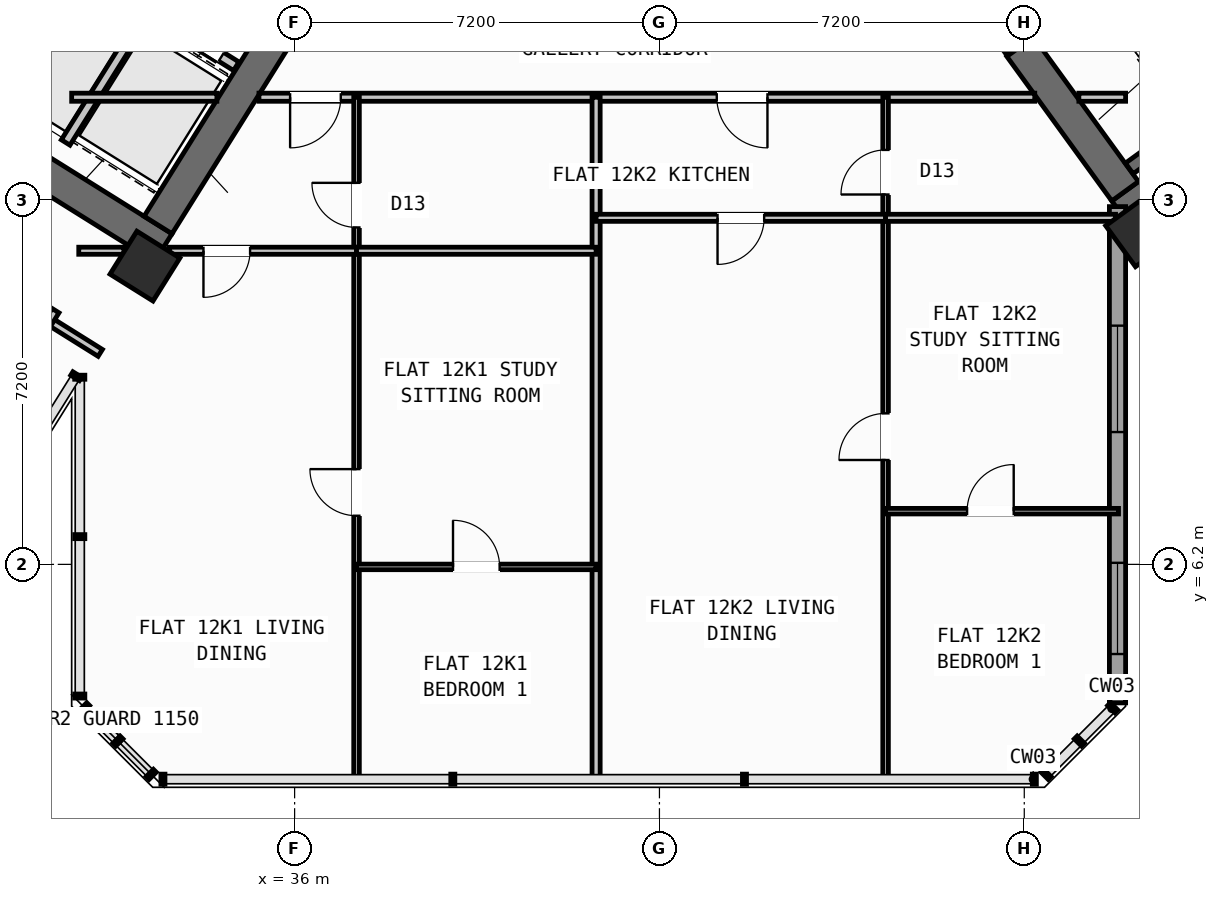
"""IFC4 building model, lengths in metres.
Left out: names, types, materials, properties, quantities, classifications, styles, units other than length and angle.
Written with IfcOpenShell. Run it as: python <this file> out.ifc"""

import sys

from ifc_helpers import new_model, si_unit, direction, frame, frame_2d, origin, origin_2d, place, context, subcontext, project, spatial, rectangle, hollow_rectangle, extrude, source, transform, mapped, element, fill, save


model = new_model("IFC4")
c1 = context("Model", 3, precision=1e-05, world=origin(), true_north=direction((0.0, 1.0)))
c2 = subcontext(c1, "Body", "Model", "MODEL_VIEW")
j1 = project(units=[si_unit("LENGTHUNIT", "METRE"), si_unit("PLANEANGLEUNIT", "RADIAN")], contexts=[c1])
p1 = place(None, origin())
s1 = spatial("IfcSite", under=j1, at=p1, CompositionType="ELEMENT")
p2 = place(p1, origin())
s2 = spatial("IfcBuilding", under=s1, at=p2, CompositionType="ELEMENT")
p3 = place(p2, frame((0.0, 0.0, 49.2)))
s3 = spatial("IfcBuildingStorey", under=s2, at=p3, CompositionType="ELEMENT", Elevation=49.2)
p4 = place(p3, frame((33.409, 12.45, 0.0), z_axis=(0.0, 0.0, 1.0), x_axis=(-0.848051132073, 0.529914405721, 0.0)))
e1 = element("IfcWall", 1, at=p4, inside=s3, PredefinedType="SHEAR", context=c2, shape_type="SweptSolid", body=[
    extrude(rectangle(XDim=13.24, YDim=0.65, at=frame_2d((6.62, 0.0))), origin(), (0.0, 0.0, 1.0), 3.35),
])
p5 = place(p3, frame((36.683, 18.304, 0.0), z_axis=(0.0, 0.0, 1.0), x_axis=(-0.529899109053, -0.848060690178, 0.0)))
e2 = element("IfcWall", 2, at=p5, inside=s3, PredefinedType="SHEAR", context=c2, shape_type="SweptSolid", body=[
    extrude(rectangle(XDim=6.375, YDim=0.65, at=frame_2d((3.188, 0.0))), origin(), (0.0, 0.0, 1.0), 3.35),
])
p6 = place(p3, frame((52.318, 13.11, 0.0), z_axis=(0.0, 0.0, 1.0), x_axis=(0.809019445368, 0.587781878776, 0.0)))
e3 = element("IfcWall", 3, at=p6, inside=s3, PredefinedType="SHEAR", context=c2, shape_type="SweptSolid", body=[
    extrude(rectangle(XDim=12.44, YDim=0.65, at=frame_2d((6.22, 0.0))), origin(), (0.0, 0.0, 1.0), 3.35),
])
p7 = place(p3, frame((52.39, 13.564, 0.0), z_axis=(0.0, 0.0, 1.0), x_axis=(-0.58779688989, 0.809008539037, 0.0)))
e4 = element("IfcWall", 4, at=p7, inside=s3, PredefinedType="SHEAR", context=c2, shape_type="SweptSolid", body=[
    extrude(rectangle(XDim=3.525, YDim=0.65, at=frame_2d((1.763, 0.0))), origin(), (0.0, 0.0, 1.0), 3.35),
])
m1 = source(origin(), c2, "Body", "SweptSolid", [
    extrude(hollow_rectangle(XDim=1.0, YDim=1.0, WallThickness=0.04, at=origin_2d()), origin(), (0.0, 0.0, 1.0), 3.6),
])
for number, where, z_axis, x_axis in (
    (5, (33.046, 12.087, 0.0), (0.0, 0.0, 1.0), (-0.848, 0.53, 0.0)),
    (6, (52.705, 12.773, 0.0), (0.0, 0.0, 1.0), (0.809, 0.588, 0.0)),
):
    element("IfcColumn", number, at=place(p3, frame(where, z_axis=z_axis, x_axis=x_axis)), inside=s3, PredefinedType="COLUMN", context=c2, shape_type="MappedRepresentation", body=[
        mapped(m1, transform((0.0, 0.0, 0.0), scale=1.0)),
    ])
p8 = place(p3, frame((56.581, 7.439, 0.0), z_axis=(0.0, 0.0, 1.0), x_axis=(-0.587785875463, 0.809016541614, 0.0)))
e7 = element("IfcWall", 7, at=p8, inside=s3, PredefinedType="STANDARD", context=c2, shape_type="SweptSolid", body=[
    extrude(rectangle(XDim=6.774, YDim=0.32, at=frame_2d((3.387, 0.0))), origin(), (0.0, 0.0, 1.0), 2.725),
])
p9 = place(p8, frame((1.556, 0.0, 0.8)))
e8 = element("IfcOpeningElement", 8, at=p9, cuts=e7, PredefinedType="OPENING", context=c2, shape_type="SweptSolid", body=[
    extrude(rectangle(XDim=2.1, YDim=1.55, at=frame_2d((1.05, 0.775))), frame((0.0, 0.17, 0.0), z_axis=(0.0, -1.0, 0.0), x_axis=(1.0, 0.0, 0.0)), (0.0, 0.0, 1.0), 0.34),
])
p10 = place(p3, frame((52.24, 13.261, 0.0), z_axis=(0.0, 0.0, 1.0), x_axis=(0.0, -1.0, 0.0)))
e9 = element("IfcWall", 9, at=p10, inside=s3, PredefinedType="STANDARD", context=c2, shape_type="SweptSolid", body=[
    extrude(rectangle(XDim=9.795, YDim=0.32, at=frame_2d((4.897, 0.0))), origin(), (0.0, 0.0, 1.0), 3.35),
])
p11 = place(p10, frame((2.349, 0.0, 0.8)))
e10 = element("IfcOpeningElement", 10, at=p11, cuts=e9, PredefinedType="OPENING", context=c2, shape_type="SweptSolid", body=[
    extrude(rectangle(XDim=2.1, YDim=1.55, at=frame_2d((1.05, 0.775))), frame((0.0, 0.17, 0.0), z_axis=(0.0, -1.0, 0.0), x_axis=(1.0, 0.0, 0.0)), (0.0, 0.0, 1.0), 0.34),
])
p12 = place(p10, frame((7.03, 0.0, 0.85)))
e11 = element("IfcOpeningElement", 11, at=p12, cuts=e9, PredefinedType="OPENING", context=c2, shape_type="SweptSolid", body=[
    extrude(rectangle(XDim=1.8, YDim=1.5, at=frame_2d((0.9, 0.75))), frame((0.0, 0.17, 0.0), z_axis=(0.0, -1.0, 0.0), x_axis=(1.0, 0.0, 0.0)), (0.0, 0.0, 1.0), 0.34),
])
p13 = place(p3, frame((31.288, 18.256, 0.0), z_axis=(0.0, 0.0, 1.0), x_axis=(-0.529943379326, -0.848033026897, 0.0)))
e12 = element("IfcWall", 12, at=p13, inside=s3, PredefinedType="SHEAR", context=c2, shape_type="SweptSolid", body=[
    extrude(rectangle(XDim=3.16, YDim=0.26, at=frame_2d((1.58, 0.0))), origin(), (0.0, 0.0, 1.0), 3.35),
])
p14 = place(p3, frame((34.848, 16.031, 0.0), z_axis=(0.0, 0.0, 1.0), x_axis=(-0.848044042236, 0.529925751807, 0.0)))
e13 = element("IfcWall", 13, at=p14, inside=s3, PredefinedType="STANDARD", context=c2, shape_type="SweptSolid", body=[
    extrude(rectangle(XDim=4.198, YDim=0.2, at=frame_2d((2.099, 0.0))), origin(), (0.0, 0.0, 1.0), 3.34),
])
p15 = place(p14, frame((0.348, 0.0, 0.0)))
e14 = element("IfcOpeningElement", 14, at=p15, cuts=e13, PredefinedType="OPENING", context=c2, shape_type="SweptSolid", body=[
    extrude(rectangle(XDim=1.3, YDim=2.2, at=frame_2d((0.65, 1.1))), frame((0.0, 0.11, 0.0), z_axis=(0.0, -1.0, 0.0), x_axis=(1.0, 0.0, 0.0)), (0.0, 0.0, 1.0), 0.22),
])
p16 = place(p14, frame((2.423, 0.0, 0.0)))
e15 = element("IfcOpeningElement", 15, at=p16, cuts=e13, PredefinedType="OPENING", context=c2, shape_type="SweptSolid", body=[
    extrude(rectangle(XDim=1.45, YDim=2.25, at=frame_2d((0.725, 1.125))), frame((0.0, 0.11, 0.0), z_axis=(0.0, -1.0, 0.0), x_axis=(1.0, 0.0, 0.0)), (0.0, 0.0, 1.0), 0.22),
])
p17 = place(p3, frame((33.029, 17.003, 0.0), z_axis=(0.0, 0.0, 1.0), x_axis=(-0.529916267533, -0.848049968695, 0.0)))
e16 = element("IfcWall", 16, at=p17, inside=s3, PredefinedType="STANDARD", context=c2, shape_type="SweptSolid", body=[
    extrude(rectangle(XDim=2.92, YDim=0.2, at=frame_2d((1.46, 0.0))), origin(), (0.0, 0.0, 1.0), 3.34),
])
p18 = place(p3, frame((52.472, 14.013, 0.0), z_axis=(0.0, 0.0, 1.0), x_axis=(0.809028366311, 0.587769599847, 0.0)))
e17 = element("IfcWall", 17, at=p18, inside=s3, PredefinedType="SHEAR", context=c2, shape_type="SweptSolid", body=[
    extrude(rectangle(XDim=7.33, YDim=0.26, at=frame_2d((3.665, 0.0))), origin(), (0.0, 0.0, 1.0), 3.35),
])
p19 = place(p3, frame((32.164, 10.374, 0.0), z_axis=(0.0, 0.0, 1.0), x_axis=(-0.848044107957, 0.529925646633, 0.0)))
e18 = element("IfcWall", 18, at=p19, inside=s3, PredefinedType="PARTITIONING", context=c2, shape_type="SweptSolid", body=[
    extrude(rectangle(XDim=15.57, YDim=0.16, at=frame_2d((7.785, 0.0))), origin(), (0.0, 0.0, 1.0), 3.34),
])
p20 = place(p19, frame((10.83, 0.0, 0.0)))
e19 = element("IfcOpeningElement", 19, at=p20, cuts=e18, PredefinedType="OPENING", context=c2, shape_type="SweptSolid", body=[
    extrude(rectangle(XDim=1.0, YDim=2.1, at=frame_2d((0.5, 1.05))), frame((0.0, 0.09, 0.0), z_axis=(0.0, -1.0, 0.0), x_axis=(1.0, 0.0, 0.0)), (0.0, 0.0, 1.0), 0.18),
])
p21 = place(p3, frame((31.282, 11.208, 0.0), z_axis=(0.0, 0.0, 1.0), x_axis=(-0.529938869374, -0.84803584519, 0.0)))
e20 = element("IfcWall", 20, at=p21, inside=s3, PredefinedType="PARTITIONING", context=c2, shape_type="SweptSolid", body=[
    extrude(rectangle(XDim=5.48, YDim=0.16, at=frame_2d((2.74, 0.0))), origin(), (0.0, 0.0, 1.0), 3.34),
])
p22 = place(p3, frame((31.6, 15.42, 0.0), z_axis=(0.0, 0.0, 1.0), x_axis=(1.0, 0.0, 0.0)))
e21 = element("IfcWall", 21, at=p22, inside=s3, PredefinedType="PARTITIONING", context=c2, shape_type="SweptSolid", body=[
    extrude(rectangle(XDim=2.866, YDim=0.16, at=frame_2d((1.433, 0.0))), origin(), (0.0, 0.0, 1.0), 3.34),
])
p23 = place(p3, frame((35.296, 15.42, 0.0), z_axis=(0.0, 0.0, 1.0), x_axis=(1.0, 0.0, 0.0)))
e22 = element("IfcWall", 22, at=p23, inside=s3, PredefinedType="PARTITIONING", context=c2, shape_type="SweptSolid", body=[
    extrude(rectangle(XDim=15.311, YDim=0.16, at=frame_2d((7.655, 0.0))), origin(), (0.0, 0.0, 1.0), 3.34),
])
p24 = place(p23, frame((0.615, 0.0, 0.0)))
e23 = element("IfcOpeningElement", 23, at=p24, cuts=e22, PredefinedType="OPENING", context=c2, shape_type="SweptSolid", body=[
    extrude(rectangle(XDim=1.0, YDim=2.1, at=frame_2d((0.5, 1.05))), frame((0.0, 0.09, 0.0), z_axis=(0.0, -1.0, 0.0), x_axis=(1.0, 0.0, 0.0)), (0.0, 0.0, 1.0), 0.18),
])
p25 = place(p23, frame((9.035, 0.0, 0.0)))
e24 = element("IfcOpeningElement", 24, at=p25, cuts=e22, PredefinedType="OPENING", context=c2, shape_type="SweptSolid", body=[
    extrude(rectangle(XDim=1.0, YDim=2.1, at=frame_2d((0.5, 1.05))), frame((0.0, 0.09, 0.0), z_axis=(0.0, -1.0, 0.0), x_axis=(1.0, 0.0, 0.0)), (0.0, 0.0, 1.0), 0.18),
])
p26 = place(p3, frame((51.477, 15.42, 0.0), z_axis=(0.0, 0.0, 1.0), x_axis=(1.0, 0.0, 0.0)))
e25 = element("IfcWall", 25, at=p26, inside=s3, PredefinedType="PARTITIONING", context=c2, shape_type="SweptSolid", body=[
    extrude(rectangle(XDim=0.923, YDim=0.16, at=frame_2d((0.461, 0.0))), origin(), (0.0, 0.0, 1.0), 3.34),
])
p27 = place(p3, frame((50.119, 16.333, 0.0), z_axis=(0.0, 0.0, 1.0), x_axis=(-0.587749856981, 0.809042709391, 0.0)))
e26 = element("IfcWall", 26, at=p27, inside=s3, PredefinedType="STANDARD", context=c2, shape_type="SweptSolid", body=[
    extrude(rectangle(XDim=2.96, YDim=0.2, at=frame_2d((1.48, 0.0))), origin(), (0.0, 0.0, 1.0), 3.34),
])
p28 = place(p27, frame((0.53, 0.0, 0.0)))
e27 = element("IfcOpeningElement", 27, at=p28, cuts=e26, PredefinedType="OPENING", context=c2, shape_type="SweptSolid", body=[
    extrude(rectangle(XDim=1.5, YDim=2.15, at=frame_2d((0.75, 1.075))), frame((0.0, 0.11, 0.0), z_axis=(0.0, -1.0, 0.0), x_axis=(1.0, 0.0, 0.0)), (0.0, 0.0, 1.0), 0.22),
])
p29 = place(p3, frame((41.95, 1.96, 0.0), z_axis=(0.0, 0.0, 1.0), x_axis=(0.0, 1.0, 0.0)))
e28 = element("IfcWall", 28, at=p29, inside=s3, PredefinedType="PARTITIONING", context=c2, shape_type="SweptSolid", body=[
    extrude(rectangle(XDim=13.46, YDim=0.16, at=frame_2d((6.73, 0.0))), origin(), (0.0, 0.0, 1.0), 3.34),
])
p30 = place(p3, frame((37.222, 1.96, 0.0), z_axis=(0.0, 0.0, 1.0), x_axis=(0.0, 1.0, 0.0)))
e29 = element("IfcWall", 29, at=p30, inside=s3, PredefinedType="PARTITIONING", context=c2, shape_type="SweptSolid", body=[
    extrude(rectangle(XDim=13.46, YDim=0.11, at=frame_2d((6.73, 0.0))), origin(), (0.0, 0.0, 1.0), 3.34),
])
p31 = place(p30, frame((5.2, 0.0, 0.0)))
e30 = element("IfcOpeningElement", 30, at=p31, cuts=e29, PredefinedType="OPENING", context=c2, shape_type="SweptSolid", body=[
    extrude(rectangle(XDim=0.92, YDim=2.08, at=frame_2d((0.46, 1.04))), frame((0.0, 0.065, 0.0), z_axis=(0.0, -1.0, 0.0), x_axis=(1.0, 0.0, 0.0)), (0.0, 0.0, 1.0), 0.13),
])
p32 = place(p30, frame((10.89, 0.0, 0.0)))
e31 = element("IfcOpeningElement", 31, at=p32, cuts=e29, PredefinedType="OPENING", context=c2, shape_type="SweptSolid", body=[
    extrude(rectangle(XDim=0.88, YDim=2.08, at=frame_2d((0.44, 1.04))), frame((0.0, 0.065, 0.0), z_axis=(0.0, -1.0, 0.0), x_axis=(1.0, 0.0, 0.0)), (0.0, 0.0, 1.0), 0.13),
])
p33 = place(p3, frame((31.74, 12.39, 0.0), z_axis=(0.0, 0.0, 1.0), x_axis=(1.0, 0.0, 0.0)))
e32 = element("IfcWall", 32, at=p33, inside=s3, PredefinedType="PLUMBINGWALL", context=c2, shape_type="SweptSolid", body=[
    extrude(rectangle(XDim=0.892, YDim=0.14, at=frame_2d((0.446, 0.0))), origin(), (0.0, 0.0, 1.0), 3.34),
])
p34 = place(p3, frame((33.527, 12.39, 0.0), z_axis=(0.0, 0.0, 1.0), x_axis=(1.0, 0.0, 0.0)))
e33 = element("IfcWall", 33, at=p34, inside=s3, PredefinedType="PLUMBINGWALL", context=c2, shape_type="SweptSolid", body=[
    extrude(rectangle(XDim=3.695, YDim=0.14, at=frame_2d((1.847, 0.0))), origin(), (0.0, 0.0, 1.0), 2.525),
])
p35 = place(p34, frame((0.674, 0.0, 0.0)))
e34 = element("IfcOpeningElement", 34, at=p35, cuts=e33, PredefinedType="OPENING", context=c2, shape_type="SweptSolid", body=[
    extrude(rectangle(XDim=0.92, YDim=2.08, at=frame_2d((0.46, 1.04))), frame((0.0, 0.08, 0.0), z_axis=(0.0, -1.0, 0.0), x_axis=(1.0, 0.0, 0.0)), (0.0, 0.0, 1.0), 0.16),
])
p36 = place(p3, frame((37.222, 12.39, 0.0), z_axis=(0.0, 0.0, 1.0), x_axis=(1.0, 0.0, 0.0)))
e35 = element("IfcWall", 35, at=p36, inside=s3, PredefinedType="PLUMBINGWALL", context=c2, shape_type="SweptSolid", body=[
    extrude(rectangle(XDim=4.728, YDim=0.14, at=frame_2d((2.364, 0.0))), origin(), (0.0, 0.0, 1.0), 2.525),
])
p37 = place(p3, frame((37.222, 6.15, 0.0), z_axis=(0.0, 0.0, 1.0), x_axis=(1.0, 0.0, 0.0)))
e36 = element("IfcWall", 36, at=p37, inside=s3, PredefinedType="PARTITIONING", context=c2, shape_type="SweptSolid", body=[
    extrude(rectangle(XDim=4.728, YDim=0.11, at=frame_2d((2.364, 0.0))), origin(), (0.0, 0.0, 1.0), 3.34),
])
p38 = place(p37, frame((1.904, 0.0, 0.0)))
e37 = element("IfcOpeningElement", 37, at=p38, cuts=e36, PredefinedType="OPENING", context=c2, shape_type="SweptSolid", body=[
    extrude(rectangle(XDim=0.92, YDim=2.08, at=frame_2d((0.46, 1.04))), frame((0.0, 0.065, 0.0), z_axis=(0.0, -1.0, 0.0), x_axis=(1.0, 0.0, 0.0)), (0.0, 0.0, 1.0), 0.13),
])
p39 = place(p3, frame((47.663, 1.96, 0.0), z_axis=(0.0, 0.0, 1.0), x_axis=(0.0, 1.0, 0.0)))
e38 = element("IfcWall", 38, at=p39, inside=s3, PredefinedType="PARTITIONING", context=c2, shape_type="SweptSolid", body=[
    extrude(rectangle(XDim=13.46, YDim=0.11, at=frame_2d((6.73, 0.0))), origin(), (0.0, 0.0, 1.0), 3.34),
])
p40 = place(p39, frame((6.3, 0.0, 0.0)))
e39 = element("IfcOpeningElement", 39, at=p40, cuts=e38, PredefinedType="OPENING", context=c2, shape_type="SweptSolid", body=[
    extrude(rectangle(XDim=0.92, YDim=2.08, at=frame_2d((0.46, 1.04))), frame((0.0, 0.065, 0.0), z_axis=(0.0, -1.0, 0.0), x_axis=(1.0, 0.0, 0.0)), (0.0, 0.0, 1.0), 0.13),
])
p41 = place(p39, frame((11.54, 0.0, 0.0)))
e40 = element("IfcOpeningElement", 40, at=p41, cuts=e38, PredefinedType="OPENING", context=c2, shape_type="SweptSolid", body=[
    extrude(rectangle(XDim=0.88, YDim=2.08, at=frame_2d((0.44, 1.04))), frame((0.0, 0.065, 0.0), z_axis=(0.0, -1.0, 0.0), x_axis=(1.0, 0.0, 0.0)), (0.0, 0.0, 1.0), 0.13),
])
p42 = place(p3, frame((41.95, 13.04, 0.0), z_axis=(0.0, 0.0, 1.0), x_axis=(1.0, 0.0, 0.0)))
e41 = element("IfcWall", 41, at=p42, inside=s3, PredefinedType="PLUMBINGWALL", context=c2, shape_type="SweptSolid", body=[
    extrude(rectangle(XDim=5.713, YDim=0.14, at=frame_2d((2.856, 0.0))), origin(), (0.0, 0.0, 1.0), 3.34),
])
p43 = place(p42, frame((2.396, 0.0, 0.0)))
e42 = element("IfcOpeningElement", 42, at=p43, cuts=e41, PredefinedType="OPENING", context=c2, shape_type="SweptSolid", body=[
    extrude(rectangle(XDim=0.92, YDim=2.08, at=frame_2d((0.46, 1.04))), frame((0.0, 0.08, 0.0), z_axis=(0.0, -1.0, 0.0), x_axis=(1.0, 0.0, 0.0)), (0.0, 0.0, 1.0), 0.16),
])
p44 = place(p3, frame((47.663, 13.04, 0.0), z_axis=(0.0, 0.0, 1.0), x_axis=(1.0, 0.0, 0.0)))
e43 = element("IfcWall", 43, at=p44, inside=s3, PredefinedType="PLUMBINGWALL", context=c2, shape_type="SweptSolid", body=[
    extrude(rectangle(XDim=4.538, YDim=0.14, at=frame_2d((2.269, 0.0))), origin(), (0.0, 0.0, 1.0), 2.525),
])
p45 = place(p3, frame((47.663, 7.25, 0.0), z_axis=(0.0, 0.0, 1.0), x_axis=(1.0, 0.0, 0.0)))
e44 = element("IfcWall", 44, at=p45, inside=s3, PredefinedType="PARTITIONING", context=c2, shape_type="SweptSolid", body=[
    extrude(rectangle(XDim=4.597, YDim=0.11, at=frame_2d((2.298, 0.0))), origin(), (0.0, 0.0, 1.0), 3.34),
])
p46 = place(p45, frame((1.608, 0.0, 0.0)))
e45 = element("IfcOpeningElement", 45, at=p46, cuts=e44, PredefinedType="OPENING", context=c2, shape_type="SweptSolid", body=[
    extrude(rectangle(XDim=0.92, YDim=2.08, at=frame_2d((0.46, 1.04))), frame((0.0, 0.065, 0.0), z_axis=(0.0, -1.0, 0.0), x_axis=(1.0, 0.0, 0.0)), (0.0, 0.0, 1.0), 0.13),
])
m2 = source(origin(), c2, "Body", "SweptSolid", [
    extrude(rectangle(XDim=2.1, YDim=1.55, at=frame_2d((1.05, 0.775))), frame((0.0, 0.03, 0.0), z_axis=(0.0, -1.0, 0.0), x_axis=(1.0, 0.0, 0.0)), (0.0, 0.0, 1.0), 0.06),
])
p47 = place(p11, origin())
e46 = element("IfcWindow", 46, at=p47, inside=s3, PartitioningType="SINGLE_PANEL", PredefinedType="WINDOW", context=c2, shape_type="MappedRepresentation", body=[
    mapped(m2, transform((0.0, 0.0, 0.0), scale=1.0)),
])
fill(e10, e46)
m3 = source(origin(), c2, "Body", "SweptSolid", [
    extrude(rectangle(XDim=1.8, YDim=1.5, at=frame_2d((0.9, 0.75))), frame((0.0, 0.03, 0.0), z_axis=(0.0, -1.0, 0.0), x_axis=(1.0, 0.0, 0.0)), (0.0, 0.0, 1.0), 0.06),
])
p48 = place(p12, origin())
e47 = element("IfcWindow", 47, at=p48, inside=s3, PartitioningType="SINGLE_PANEL", PredefinedType="WINDOW", context=c2, shape_type="MappedRepresentation", body=[
    mapped(m3, transform((0.0, 0.0, 0.0), scale=1.0)),
])
fill(e11, e47)
m4 = source(origin(), c2, "Body", "SweptSolid", [
    extrude(rectangle(XDim=1.3, YDim=2.2, at=frame_2d((0.65, 1.1))), frame((0.0, 0.025, 0.0), z_axis=(0.0, -1.0, 0.0), x_axis=(1.0, 0.0, 0.0)), (0.0, 0.0, 1.0), 0.05),
])
p49 = place(p15, origin())
e48 = element("IfcDoor", 48, at=p49, inside=s3, OperationType="DOUBLE_DOOR_SLIDING", PredefinedType="DOOR", context=c2, shape_type="MappedRepresentation", body=[
    mapped(m4, transform((0.0, 0.0, 0.0), scale=1.0)),
])
fill(e14, e48)
m5 = source(origin(), c2, "Body", "SweptSolid", [
    extrude(rectangle(XDim=0.92, YDim=2.08, at=frame_2d((0.46, 1.04))), frame((0.0, 0.025, 0.0), z_axis=(0.0, -1.0, 0.0), x_axis=(1.0, 0.0, 0.0)), (0.0, 0.0, 1.0), 0.05),
])
p50 = place(p31, origin())
e49 = element("IfcDoor", 49, at=p50, inside=s3, OperationType="SINGLE_SWING_RIGHT", PredefinedType="DOOR", context=c2, shape_type="MappedRepresentation", body=[
    mapped(m5, transform((0.0, 0.0, 0.0), scale=1.0)),
])
fill(e30, e49)
p51 = place(p38, origin())
e50 = element("IfcDoor", 50, at=p51, inside=s3, OperationType="SINGLE_SWING_LEFT", PredefinedType="DOOR", context=c2, shape_type="MappedRepresentation", body=[
    mapped(m5, transform((0.0, 0.0, 0.0), scale=1.0)),
])
fill(e37, e50)
m6 = source(origin(), c2, "Body", "SweptSolid", [
    extrude(rectangle(XDim=1.0, YDim=2.1, at=frame_2d((0.5, 1.05))), frame((0.0, 0.025, 0.0), z_axis=(0.0, -1.0, 0.0), x_axis=(1.0, 0.0, 0.0)), (0.0, 0.0, 1.0), 0.05),
])
p52 = place(p24, frame((1.0, 0.0, 0.0), z_axis=(0.0, 0.0, 1.0), x_axis=(-1.0, 0.0, 0.0)))
e51 = element("IfcDoor", 51, at=p52, inside=s3, OperationType="SINGLE_SWING_RIGHT", PredefinedType="DOOR", context=c2, shape_type="MappedRepresentation", body=[
    mapped(m6, transform((0.0, 0.0, 0.0), scale=1.0)),
])
fill(e23, e51)
p53 = place(p35, frame((0.92, 0.0, 0.0), z_axis=(0.0, 0.0, 1.0), x_axis=(-1.0, 0.0, 0.0)))
e52 = element("IfcDoor", 52, at=p53, inside=s3, OperationType="SINGLE_SWING_RIGHT", PredefinedType="DOOR", context=c2, shape_type="MappedRepresentation", body=[
    mapped(m5, transform((0.0, 0.0, 0.0), scale=1.0)),
])
fill(e34, e52)
m7 = source(origin(), c2, "Body", "SweptSolid", [
    extrude(rectangle(XDim=0.88, YDim=2.08, at=frame_2d((0.44, 1.04))), frame((0.0, 0.025, 0.0), z_axis=(0.0, -1.0, 0.0), x_axis=(1.0, 0.0, 0.0)), (0.0, 0.0, 1.0), 0.05),
])
p54 = place(p32, origin())
e53 = element("IfcDoor", 53, at=p54, inside=s3, OperationType="SINGLE_SWING_RIGHT", PredefinedType="DOOR", context=c2, shape_type="MappedRepresentation", body=[
    mapped(m7, transform((0.0, 0.0, 0.0), scale=1.0)),
])
fill(e31, e53)
p55 = place(p40, origin())
e54 = element("IfcDoor", 54, at=p55, inside=s3, OperationType="SINGLE_SWING_LEFT", PredefinedType="DOOR", context=c2, shape_type="MappedRepresentation", body=[
    mapped(m5, transform((0.0, 0.0, 0.0), scale=1.0)),
])
fill(e39, e54)
p56 = place(p46, origin())
e55 = element("IfcDoor", 55, at=p56, inside=s3, OperationType="SINGLE_SWING_RIGHT", PredefinedType="DOOR", context=c2, shape_type="MappedRepresentation", body=[
    mapped(m5, transform((0.0, 0.0, 0.0), scale=1.0)),
])
fill(e45, e55)
p57 = place(p25, frame((1.0, 0.0, 0.0), z_axis=(0.0, 0.0, 1.0), x_axis=(-1.0, 0.0, 0.0)))
e56 = element("IfcDoor", 56, at=p57, inside=s3, OperationType="SINGLE_SWING_LEFT", PredefinedType="DOOR", context=c2, shape_type="MappedRepresentation", body=[
    mapped(m6, transform((0.0, 0.0, 0.0), scale=1.0)),
])
fill(e24, e56)
p58 = place(p43, frame((0.92, 0.0, 0.0), z_axis=(0.0, 0.0, 1.0), x_axis=(-1.0, 0.0, 0.0)))
e57 = element("IfcDoor", 57, at=p58, inside=s3, OperationType="SINGLE_SWING_RIGHT", PredefinedType="DOOR", context=c2, shape_type="MappedRepresentation", body=[
    mapped(m5, transform((0.0, 0.0, 0.0), scale=1.0)),
])
fill(e42, e57)
p59 = place(p41, origin())
e58 = element("IfcDoor", 58, at=p59, inside=s3, OperationType="SINGLE_SWING_LEFT", PredefinedType="DOOR", context=c2, shape_type="MappedRepresentation", body=[
    mapped(m7, transform((0.0, 0.0, 0.0), scale=1.0)),
])
fill(e40, e58)
save(model, sys.argv[1])
